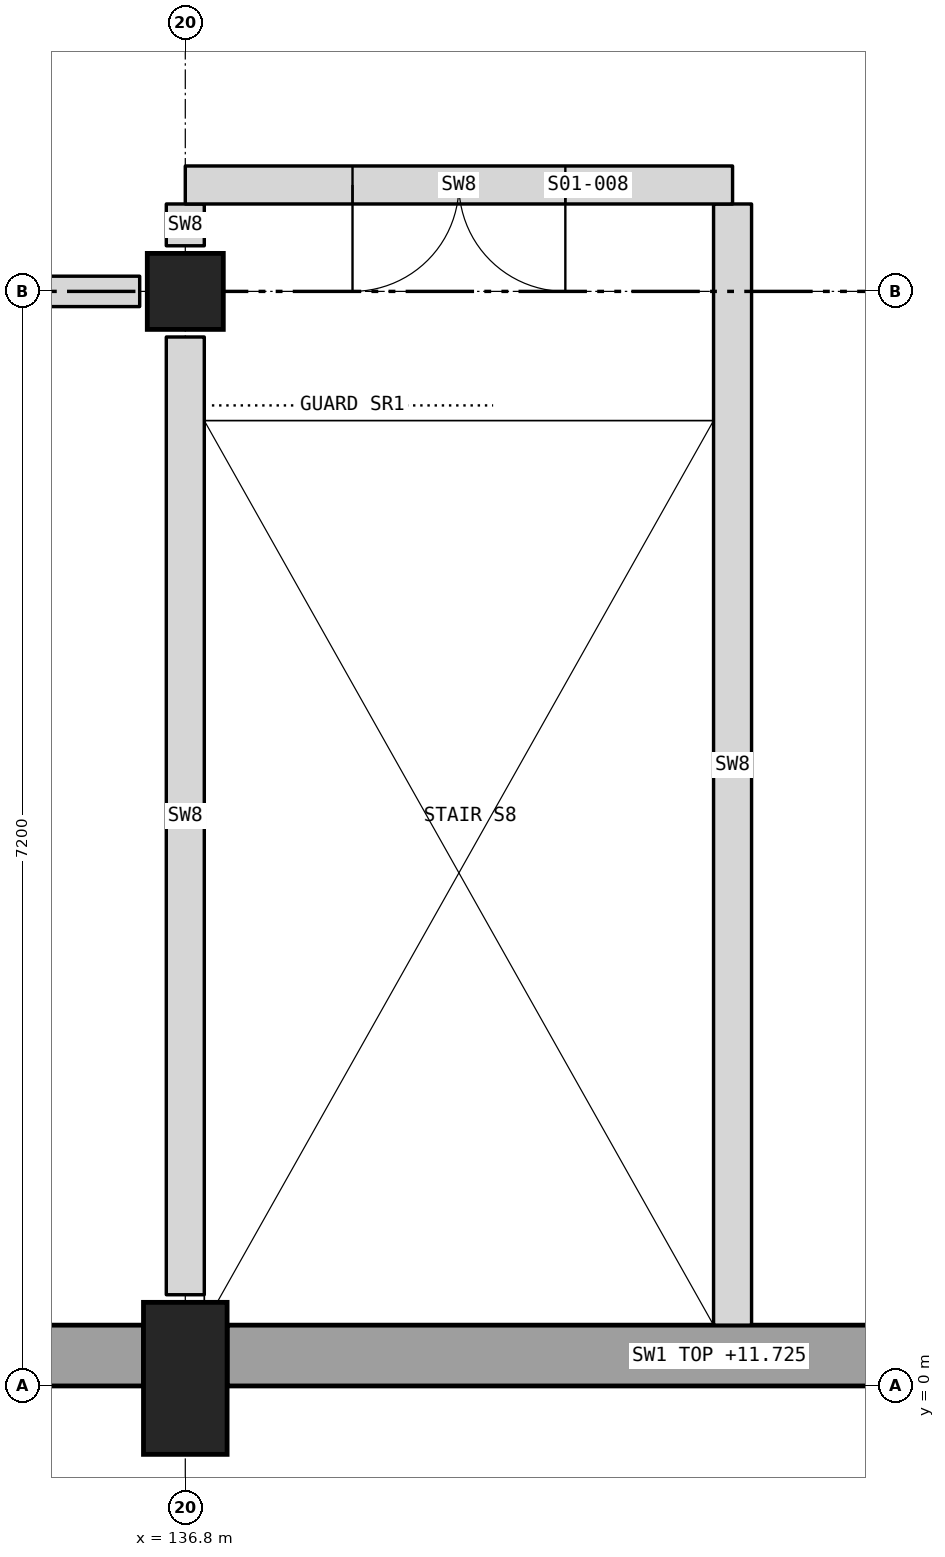
"""IFC4 building model, lengths in metres.
Left out: names, types, materials, properties, quantities, classifications, styles, units other than length and angle.
Written with IfcOpenShell. Run it as: python <this file> out.ifc"""

import sys

from ifc_helpers import new_model, si_unit, direction, frame, frame_2d, origin, origin_2d, place, context, subcontext, project, spatial, rectangle, extrude, element, fill, save


model = new_model("IFC4")
c1 = context("Model", 3, precision=1e-05, world=origin(), true_north=direction((0.0, 1.0)))
c2 = subcontext(c1, "Body", "Model", "MODEL_VIEW")
j1 = project(units=[si_unit("LENGTHUNIT", "METRE"), si_unit("PLANEANGLEUNIT", "RADIAN")], contexts=[c1])
p1 = place(None, origin())
s1 = spatial("IfcSite", under=j1, at=p1, CompositionType="ELEMENT")
p2 = place(p1, origin())
s2 = spatial("IfcBuilding", under=s1, at=p2, CompositionType="ELEMENT")
p3 = place(p2, frame((0.0, 0.0, 6.0)))
s3 = spatial("IfcBuildingStorey", under=s2, at=p3, CompositionType="ELEMENT", Elevation=6.0)
p4 = place(p3, frame((136.8, 0.05, 0.0), z_axis=(0.0, 0.0, 1.0), x_axis=(1.0, 0.0, 0.0)))
e1 = element("IfcColumn", 1, at=p4, inside=s3, PredefinedType="COLUMN", context=c2, shape_type="SweptSolid", body=[
    extrude(rectangle(XDim=0.55, YDim=1.0, at=origin_2d()), origin(), (0.0, 0.0, 1.0), 6.0),
])
p5 = place(p3, frame((136.8, 7.2, 0.0), z_axis=(0.0, 0.0, 1.0), x_axis=(1.0, 0.0, 0.0)))
e2 = element("IfcColumn", 2, at=p5, inside=s3, PredefinedType="COLUMN", context=c2, shape_type="SweptSolid", body=[
    extrude(rectangle(XDim=0.5, YDim=0.5, at=origin_2d()), origin(), (0.0, 0.0, 1.0), 6.0),
])
p6 = place(p3, frame((135.0, 0.2, 0.0), z_axis=(0.0, 0.0, 1.0), x_axis=(1.0, 0.0, 0.0)))
e3 = element("IfcWall", 3, at=p6, inside=s3, PredefinedType="SOLIDWALL", context=c2, shape_type="SweptSolid", body=[
    extrude(rectangle(XDim=1.525, YDim=0.4, at=frame_2d((0.762, 0.0))), origin(), (0.0, 0.0, 1.0), 5.725),
])
p7 = place(p3, frame((137.075, 0.2, 0.0), z_axis=(0.0, 0.0, 1.0), x_axis=(1.0, 0.0, 0.0)))
e4 = element("IfcWall", 4, at=p7, inside=s3, PredefinedType="SOLIDWALL", context=c2, shape_type="SweptSolid", body=[
    extrude(rectangle(XDim=6.475, YDim=0.4, at=frame_2d((3.238, 0.0))), origin(), (0.0, 0.0, 1.0), 5.725),
])
p8 = place(p3, frame((136.8, 0.6, 0.0), z_axis=(0.0, 0.0, 1.0), x_axis=(0.0, 1.0, 0.0)))
e5 = element("IfcWall", 5, at=p8, inside=s3, PredefinedType="SOLIDWALL", context=c2, shape_type="SweptSolid", body=[
    extrude(rectangle(XDim=6.3, YDim=0.25, at=frame_2d((3.15, 0.0))), origin(), (0.0, 0.0, 1.0), 5.725),
])
p9 = place(p3, frame((136.8, 7.5, 0.0), z_axis=(0.0, 0.0, 1.0), x_axis=(0.0, 1.0, 0.0)))
e6 = element("IfcWall", 6, at=p9, inside=s3, PredefinedType="SOLIDWALL", context=c2, shape_type="SweptSolid", body=[
    extrude(rectangle(XDim=0.275, YDim=0.25, at=frame_2d((0.137, 0.0))), origin(), (0.0, 0.0, 1.0), 5.725),
])
p10 = place(p3, frame((140.4, 0.4, 0.0), z_axis=(0.0, 0.0, 1.0), x_axis=(0.0, 1.0, 0.0)))
e7 = element("IfcWall", 7, at=p10, inside=s3, PredefinedType="SOLIDWALL", context=c2, shape_type="SweptSolid", body=[
    extrude(rectangle(XDim=7.375, YDim=0.25, at=frame_2d((3.688, 0.0))), origin(), (0.0, 0.0, 1.0), 5.725),
])
p11 = place(p3, frame((129.9, 7.2, 0.0), z_axis=(0.0, 0.0, 1.0), x_axis=(1.0, 0.0, 0.0)))
e8 = element("IfcWall", 8, at=p11, inside=s3, PredefinedType="PARTITIONING", context=c2, shape_type="SweptSolid", body=[
    extrude(rectangle(XDim=6.6, YDim=0.2, at=frame_2d((3.3, 0.0))), origin(), (0.0, 0.0, 1.0), 5.725),
])
p12 = place(p11, frame((0.6, 0.0, 0.0)))
e9 = element("IfcOpeningElement", 9, at=p12, cuts=e8, PredefinedType="OPENING", context=c2, shape_type="SweptSolid", body=[
    extrude(rectangle(XDim=1.8, YDim=2.1, at=frame_2d((0.9, 1.05))), frame((0.0, 0.11, 0.0), z_axis=(0.0, -1.0, 0.0), x_axis=(1.0, 0.0, 0.0)), (0.0, 0.0, 1.0), 0.22),
])
p13 = place(p3, frame((136.8, 7.9, 0.0), z_axis=(0.0, 0.0, 1.0), x_axis=(1.0, 0.0, 0.0)))
e10 = element("IfcWall", 10, at=p13, inside=s3, PredefinedType="SOLIDWALL", context=c2, shape_type="SweptSolid", body=[
    extrude(rectangle(XDim=3.6, YDim=0.25, at=frame_2d((1.8, 0.0))), origin(), (0.0, 0.0, 1.0), 5.725),
])
p14 = place(p13, frame((1.1, 0.0, 0.0)))
e11 = element("IfcOpeningElement", 11, at=p14, cuts=e10, PredefinedType="OPENING", context=c2, shape_type="SweptSolid", body=[
    extrude(rectangle(XDim=1.4, YDim=2.1, at=frame_2d((0.7, 1.05))), frame((0.0, 0.135, 0.0), z_axis=(0.0, -1.0, 0.0), x_axis=(1.0, 0.0, 0.0)), (0.0, 0.0, 1.0), 0.27),
])
p15 = place(p14, frame((1.4, 0.0, 0.0), z_axis=(0.0, 0.0, 1.0), x_axis=(-1.0, 0.0, 0.0)))
e12 = element("IfcDoor", 12, at=p15, inside=s3, OperationType="DOUBLE_DOOR_SINGLE_SWING", PredefinedType="DOOR", context=c2, shape_type="SweptSolid", body=[
    extrude(rectangle(XDim=1.4, YDim=2.1, at=frame_2d((0.7, 1.05))), frame((0.0, 0.025, 0.0), z_axis=(0.0, -1.0, 0.0), x_axis=(1.0, 0.0, 0.0)), (0.0, 0.0, 1.0), 0.05),
])
fill(e11, e12)
save(model, sys.argv[1])
